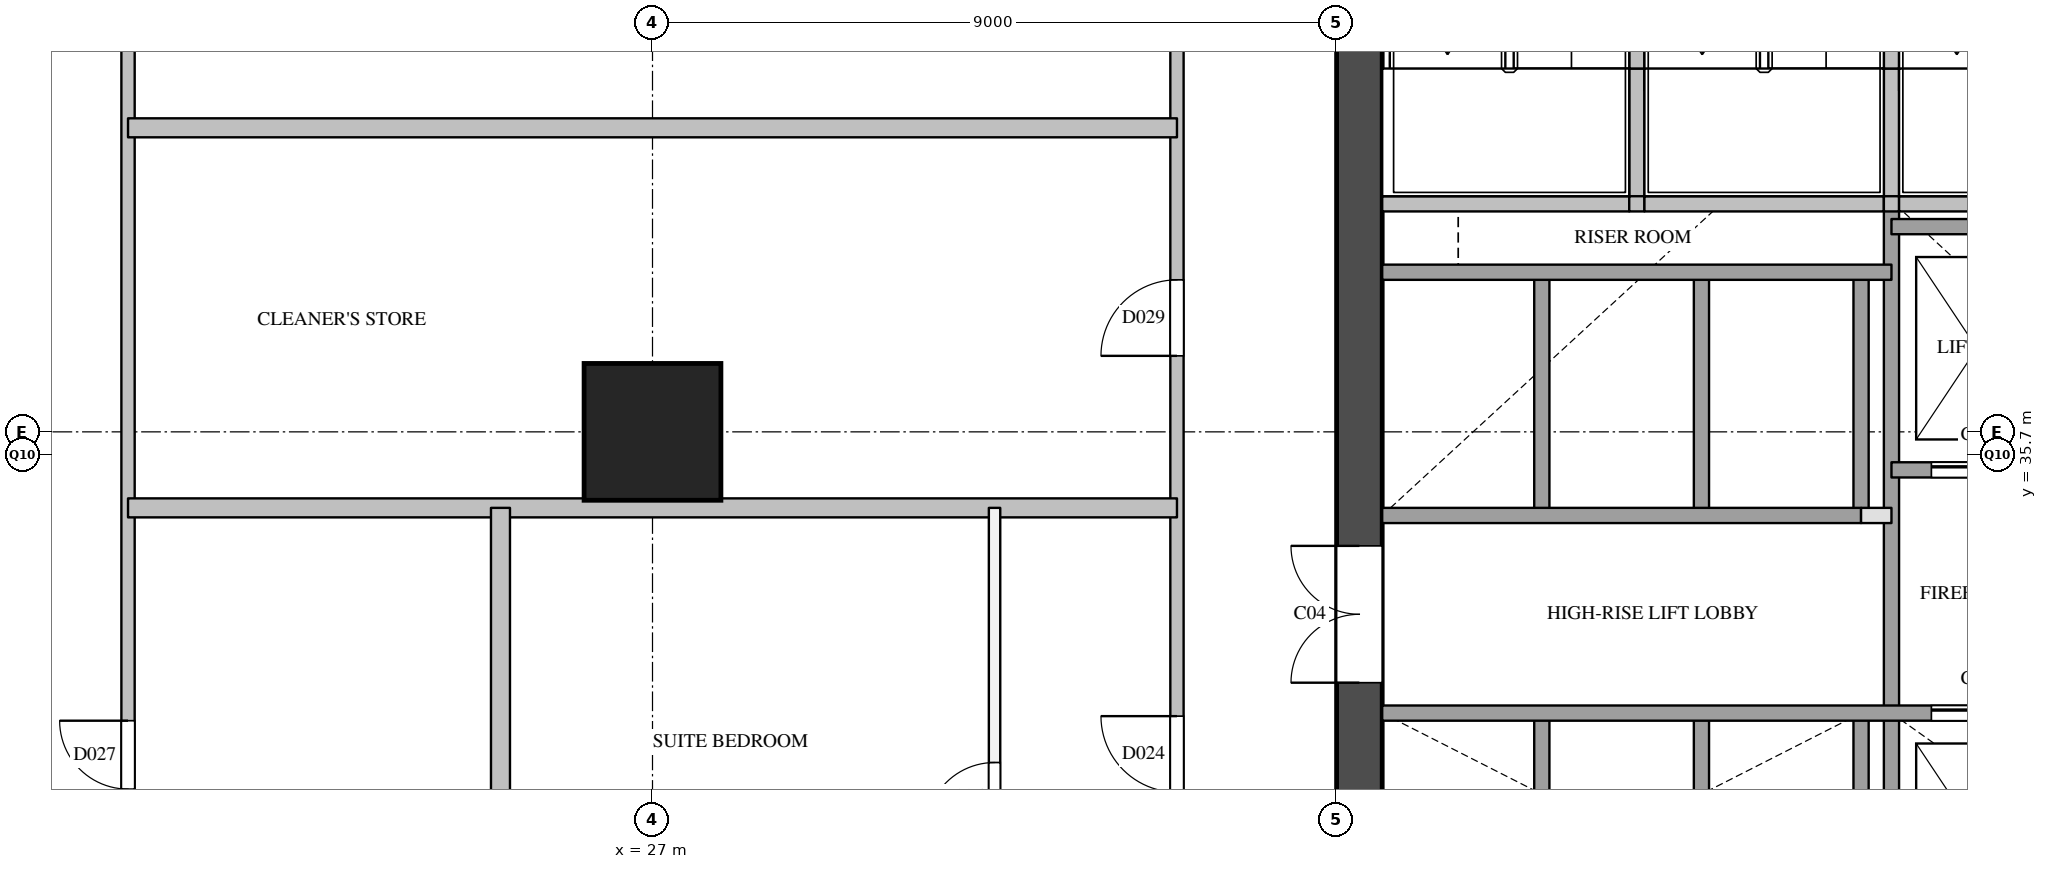
"""IFC4 building model, lengths in metres.
Left out: names, types, materials, properties, quantities, classifications, styles, units other than length and angle.
Written with IfcOpenShell. Run it as: python <this file> out.ifc"""

import sys

from ifc_helpers import new_model, si_unit, direction, frame, frame_2d, origin, origin_2d, place, context, subcontext, project, spatial, rectangle, extrude, element, fill, save


model = new_model("IFC4")
c1 = context("Model", 3, precision=1e-05, world=origin(), true_north=direction((0.0, 1.0)))
c2 = subcontext(c1, "Body", "Model", "MODEL_VIEW")
j1 = project(units=[si_unit("LENGTHUNIT", "METRE"), si_unit("PLANEANGLEUNIT", "RADIAN")], contexts=[c1])
p1 = place(None, origin())
s1 = spatial("IfcSite", under=j1, at=p1, CompositionType="ELEMENT")
p2 = place(p1, origin())
s2 = spatial("IfcBuilding", under=s1, at=p2, CompositionType="ELEMENT")
p3 = place(p2, frame((0.0, 0.0, 85.4)))
s3 = spatial("IfcBuildingStorey", under=s2, at=p3, CompositionType="ELEMENT", Elevation=85.4)
p4 = place(p3, frame((27.0, 36.0, 0.0), z_axis=(0.0, 0.0, 1.0), x_axis=(1.0, 0.0, 0.0)))
e1 = element("IfcColumn", 1, at=p4, inside=s3, PredefinedType="COLUMN", context=c2, shape_type="SweptSolid", body=[
    extrude(rectangle(XDim=1.8, YDim=1.8, at=origin_2d()), origin(), (0.0, 0.0, 1.0), 3.8),
])
p5 = place(p3, frame((36.3, 29.1, 0.0), z_axis=(0.0, 0.0, 1.0), x_axis=(0.0, 1.0, 0.0)))
e2 = element("IfcWall", 2, at=p5, inside=s3, PredefinedType="SHEAR", context=c2, shape_type="SweptSolid", body=[
    extrude(rectangle(XDim=20.3, YDim=0.6, at=frame_2d((10.15, 0.0))), origin(), (0.0, 0.0, 1.0), 3.5),
])
p6 = place(p5, frame((3.6, 0.0, 0.0)))
e3 = element("IfcOpeningElement", 3, at=p6, cuts=e2, PredefinedType="OPENING", context=c2, shape_type="SweptSolid", body=[
    extrude(rectangle(XDim=1.8, YDim=2.1, at=frame_2d((0.9, 1.05))), frame((0.0, 0.31, 0.0), z_axis=(0.0, -1.0, 0.0), x_axis=(1.0, 0.0, 0.0)), (0.0, 0.0, 1.0), 0.62),
])
p7 = place(p5, frame((16.4, 0.0, 0.0)))
e4 = element("IfcOpeningElement", 4, at=p7, cuts=e2, PredefinedType="OPENING", context=c2, shape_type="SweptSolid", body=[
    extrude(rectangle(XDim=1.0, YDim=2.1, at=frame_2d((0.5, 1.05))), frame((0.0, 0.31, 0.0), z_axis=(0.0, -1.0, 0.0), x_axis=(1.0, 0.0, 0.0)), (0.0, 0.0, 1.0), 0.62),
])
p8 = place(p3, frame((38.7, 29.1, 0.0), z_axis=(0.0, 0.0, 1.0), x_axis=(0.0, 1.0, 0.0)))
e5 = element("IfcWall", 5, at=p8, inside=s3, PredefinedType="SOLIDWALL", context=c2, shape_type="SweptSolid", body=[
    extrude(rectangle(XDim=3.2, YDim=0.2, at=frame_2d((1.6, 0.0))), origin(), (0.0, 0.0, 1.0), 3.5),
])
p9 = place(p3, frame((38.7, 34.9, 0.0), z_axis=(0.0, 0.0, 1.0), x_axis=(0.0, 1.0, 0.0)))
e6 = element("IfcWall", 6, at=p9, inside=s3, PredefinedType="SOLIDWALL", context=c2, shape_type="SweptSolid", body=[
    extrude(rectangle(XDim=3.2, YDim=0.2, at=frame_2d((1.6, 0.0))), origin(), (0.0, 0.0, 1.0), 3.5),
])
p10 = place(p3, frame((39.95, 39.0, 0.0), z_axis=(0.0, 0.0, 1.0), x_axis=(0.0, 1.0, 0.0)))
e7 = element("IfcWall", 7, at=p10, inside=s3, PredefinedType="SOLIDWALL", context=c2, shape_type="SweptSolid", body=[
    extrude(rectangle(XDim=1.78, YDim=0.2, at=frame_2d((0.89, 0.0))), origin(), (0.0, 0.0, 1.0), 3.5),
])
p11 = place(p3, frame((39.95, 40.78, 0.0), z_axis=(0.0, 0.0, 1.0), x_axis=(0.0, 1.0, 0.0)))
e8 = element("IfcWall", 8, at=p11, inside=s3, PredefinedType="SOLIDWALL", context=c2, shape_type="SweptSolid", body=[
    extrude(rectangle(XDim=4.42, YDim=0.2, at=frame_2d((2.21, 0.0))), origin(), (0.0, 0.0, 1.0), 3.5),
])
p12 = place(p3, frame((40.8, 29.1, 0.0), z_axis=(0.0, 0.0, 1.0), x_axis=(0.0, 1.0, 0.0)))
e9 = element("IfcWall", 9, at=p12, inside=s3, PredefinedType="SOLIDWALL", context=c2, shape_type="SweptSolid", body=[
    extrude(rectangle(XDim=3.2, YDim=0.2, at=frame_2d((1.6, 0.0))), origin(), (0.0, 0.0, 1.0), 3.5),
])
p13 = place(p3, frame((40.8, 34.9, 0.0), z_axis=(0.0, 0.0, 1.0), x_axis=(0.0, 1.0, 0.0)))
e10 = element("IfcWall", 10, at=p13, inside=s3, PredefinedType="SOLIDWALL", context=c2, shape_type="SweptSolid", body=[
    extrude(rectangle(XDim=3.2, YDim=0.2, at=frame_2d((1.6, 0.0))), origin(), (0.0, 0.0, 1.0), 3.5),
])
p14 = place(p3, frame((42.9, 29.1, 0.0), z_axis=(0.0, 0.0, 1.0), x_axis=(0.0, 1.0, 0.0)))
e11 = element("IfcWall", 11, at=p14, inside=s3, PredefinedType="SOLIDWALL", context=c2, shape_type="SweptSolid", body=[
    extrude(rectangle(XDim=3.2, YDim=0.2, at=frame_2d((1.6, 0.0))), origin(), (0.0, 0.0, 1.0), 3.5),
])
p15 = place(p3, frame((42.9, 34.9, 0.0), z_axis=(0.0, 0.0, 1.0), x_axis=(0.0, 1.0, 0.0)))
e12 = element("IfcWall", 12, at=p15, inside=s3, PredefinedType="SOLIDWALL", context=c2, shape_type="SweptSolid", body=[
    extrude(rectangle(XDim=3.2, YDim=0.2, at=frame_2d((1.6, 0.0))), origin(), (0.0, 0.0, 1.0), 3.5),
])
p16 = place(p3, frame((43.3, 29.1, 0.0), z_axis=(0.0, 0.0, 1.0), x_axis=(0.0, 1.0, 0.0)))
e13 = element("IfcWall", 13, at=p16, inside=s3, PredefinedType="SOLIDWALL", context=c2, shape_type="SweptSolid", body=[
    extrude(rectangle(XDim=9.9, YDim=0.2, at=frame_2d((4.95, 0.0))), origin(), (0.0, 0.0, 1.0), 3.5),
])
p17 = place(p3, frame((43.3, 39.0, 0.0), z_axis=(0.0, 0.0, 1.0), x_axis=(0.0, 1.0, 0.0)))
e14 = element("IfcWall", 14, at=p17, inside=s3, PredefinedType="SOLIDWALL", context=c2, shape_type="SweptSolid", body=[
    extrude(rectangle(XDim=1.78, YDim=0.2, at=frame_2d((0.89, 0.0))), origin(), (0.0, 0.0, 1.0), 3.5),
])
p18 = place(p3, frame((43.3, 40.78, 0.0), z_axis=(0.0, 0.0, 1.0), x_axis=(0.0, 1.0, 0.0)))
e15 = element("IfcWall", 15, at=p18, inside=s3, PredefinedType="SOLIDWALL", context=c2, shape_type="SweptSolid", body=[
    extrude(rectangle(XDim=4.42, YDim=0.2, at=frame_2d((2.21, 0.0))), origin(), (0.0, 0.0, 1.0), 3.5),
])
p19 = place(p3, frame((36.6, 32.3, 0.0), z_axis=(0.0, 0.0, 1.0), x_axis=(1.0, 0.0, 0.0)))
e16 = element("IfcWall", 16, at=p19, inside=s3, PredefinedType="SOLIDWALL", context=c2, shape_type="SweptSolid", body=[
    extrude(rectangle(XDim=11.2, YDim=0.2, at=frame_2d((5.6, 0.0))), origin(), (0.0, 0.0, 1.0), 3.5),
])
p20 = place(p19, frame((7.225, 0.0, 0.0)))
e17 = element("IfcOpeningElement", 17, at=p20, cuts=e16, PredefinedType="OPENING", context=c2, shape_type="SweptSolid", body=[
    extrude(rectangle(XDim=1.2, YDim=2.1, at=frame_2d((0.6, 1.05))), frame((0.0, 0.11, 0.0), z_axis=(0.0, -1.0, 0.0), x_axis=(1.0, 0.0, 0.0)), (0.0, 0.0, 1.0), 0.22),
])
p21 = place(p19, frame((9.475, 0.0, 0.0)))
e18 = element("IfcOpeningElement", 18, at=p21, cuts=e16, PredefinedType="OPENING", context=c2, shape_type="SweptSolid", body=[
    extrude(rectangle(XDim=1.2, YDim=2.1, at=frame_2d((0.6, 1.05))), frame((0.0, 0.11, 0.0), z_axis=(0.0, -1.0, 0.0), x_axis=(1.0, 0.0, 0.0)), (0.0, 0.0, 1.0), 0.22),
])
p22 = place(p3, frame((42.9, 34.9, 0.0), z_axis=(0.0, 0.0, 1.0), x_axis=(1.0, 0.0, 0.0)))
e19 = element("IfcWall", 19, at=p22, inside=s3, PredefinedType="PARTITIONING", context=c2, shape_type="SweptSolid", body=[
    extrude(rectangle(XDim=0.4, YDim=0.2, at=frame_2d((0.2, 0.0))), origin(), (0.0, 0.0, 1.0), 3.5),
])
p23 = place(p3, frame((36.6, 34.9, 0.0), z_axis=(0.0, 0.0, 1.0), x_axis=(1.0, 0.0, 0.0)))
e20 = element("IfcWall", 20, at=p23, inside=s3, PredefinedType="SOLIDWALL", context=c2, shape_type="SweptSolid", body=[
    extrude(rectangle(XDim=6.3, YDim=0.2, at=frame_2d((3.15, 0.0))), origin(), (0.0, 0.0, 1.0), 3.5),
])
p24 = place(p3, frame((43.3, 35.5, 0.0), z_axis=(0.0, 0.0, 1.0), x_axis=(1.0, 0.0, 0.0)))
e21 = element("IfcWall", 21, at=p24, inside=s3, PredefinedType="SOLIDWALL", context=c2, shape_type="SweptSolid", body=[
    extrude(rectangle(XDim=4.5, YDim=0.2, at=frame_2d((2.25, 0.0))), origin(), (0.0, 0.0, 1.0), 3.5),
])
p25 = place(p24, frame((0.525, 0.0, 0.0)))
e22 = element("IfcOpeningElement", 22, at=p25, cuts=e21, PredefinedType="OPENING", context=c2, shape_type="SweptSolid", body=[
    extrude(rectangle(XDim=1.2, YDim=2.1, at=frame_2d((0.6, 1.05))), frame((0.0, 0.11, 0.0), z_axis=(0.0, -1.0, 0.0), x_axis=(1.0, 0.0, 0.0)), (0.0, 0.0, 1.0), 0.22),
])
p26 = place(p24, frame((3.025, 0.0, 0.0)))
e23 = element("IfcOpeningElement", 23, at=p26, cuts=e21, PredefinedType="OPENING", context=c2, shape_type="SweptSolid", body=[
    extrude(rectangle(XDim=0.7, YDim=2.1, at=frame_2d((0.35, 1.05))), frame((0.0, 0.11, 0.0), z_axis=(0.0, -1.0, 0.0), x_axis=(1.0, 0.0, 0.0)), (0.0, 0.0, 1.0), 0.22),
])
p27 = place(p3, frame((36.6, 38.1, 0.0), z_axis=(0.0, 0.0, 1.0), x_axis=(1.0, 0.0, 0.0)))
e24 = element("IfcWall", 24, at=p27, inside=s3, PredefinedType="SOLIDWALL", context=c2, shape_type="SweptSolid", body=[
    extrude(rectangle(XDim=6.7, YDim=0.2, at=frame_2d((3.35, 0.0))), origin(), (0.0, 0.0, 1.0), 3.5),
])
p28 = place(p3, frame((43.3, 38.7, 0.0), z_axis=(0.0, 0.0, 1.0), x_axis=(1.0, 0.0, 0.0)))
e25 = element("IfcWall", 25, at=p28, inside=s3, PredefinedType="SOLIDWALL", context=c2, shape_type="SweptSolid", body=[
    extrude(rectangle(XDim=4.5, YDim=0.2, at=frame_2d((2.25, 0.0))), origin(), (0.0, 0.0, 1.0), 3.5),
])
p29 = place(p3, frame((36.6, 39.0, 0.0), z_axis=(0.0, 0.0, 1.0), x_axis=(1.0, 0.0, 0.0)))
e26 = element("IfcWall", 26, at=p29, inside=s3, PredefinedType="SOLIDWALL", context=c2, shape_type="SweptSolid", body=[
    extrude(rectangle(XDim=3.25, YDim=0.2, at=frame_2d((1.625, 0.0))), origin(), (0.0, 0.0, 1.0), 3.5),
])
p30 = place(p3, frame((39.85, 39.0, 0.0), z_axis=(0.0, 0.0, 1.0), x_axis=(1.0, 0.0, 0.0)))
e27 = element("IfcWall", 27, at=p30, inside=s3, PredefinedType="SOLIDWALL", context=c2, shape_type="SweptSolid", body=[
    extrude(rectangle(XDim=0.2, YDim=0.2, at=frame_2d((0.1, 0.0))), origin(), (0.0, 0.0, 1.0), 3.5),
])
p31 = place(p3, frame((40.05, 39.0, 0.0), z_axis=(0.0, 0.0, 1.0), x_axis=(1.0, 0.0, 0.0)))
e28 = element("IfcWall", 28, at=p31, inside=s3, PredefinedType="SOLIDWALL", context=c2, shape_type="SweptSolid", body=[
    extrude(rectangle(XDim=3.15, YDim=0.2, at=frame_2d((1.575, 0.0))), origin(), (0.0, 0.0, 1.0), 3.5),
])
p32 = place(p3, frame((43.2, 39.0, 0.0), z_axis=(0.0, 0.0, 1.0), x_axis=(1.0, 0.0, 0.0)))
e29 = element("IfcWall", 29, at=p32, inside=s3, PredefinedType="SOLIDWALL", context=c2, shape_type="SweptSolid", body=[
    extrude(rectangle(XDim=0.2, YDim=0.2, at=frame_2d((0.1, 0.0))), origin(), (0.0, 0.0, 1.0), 3.5),
])
p33 = place(p3, frame((43.4, 39.0, 0.0), z_axis=(0.0, 0.0, 1.0), x_axis=(1.0, 0.0, 0.0)))
e30 = element("IfcWall", 30, at=p33, inside=s3, PredefinedType="SOLIDWALL", context=c2, shape_type="SweptSolid", body=[
    extrude(rectangle(XDim=3.25, YDim=0.2, at=frame_2d((1.625, 0.0))), origin(), (0.0, 0.0, 1.0), 3.5),
])
p34 = place(p3, frame((20.1, 28.5, 0.0), z_axis=(0.0, 0.0, 1.0), x_axis=(0.0, 1.0, 0.0)))
e31 = element("IfcWall", 31, at=p34, inside=s3, PredefinedType="PARTITIONING", context=c2, shape_type="SweptSolid", body=[
    extrude(rectangle(XDim=23.6, YDim=0.175, at=frame_2d((11.8, 0.0))), origin(), (0.0, 0.0, 1.0), 3.5),
])
p35 = place(p34, frame((2.8, 0.0, 0.0)))
e32 = element("IfcOpeningElement", 32, at=p35, cuts=e31, PredefinedType="OPENING", context=c2, shape_type="SweptSolid", body=[
    extrude(rectangle(XDim=0.9, YDim=2.1, at=frame_2d((0.45, 1.05))), frame((0.0, 0.097, 0.0), z_axis=(0.0, -1.0, 0.0), x_axis=(1.0, 0.0, 0.0)), (0.0, 0.0, 1.0), 0.195),
])
p36 = place(p34, frame((19.6, 0.0, 0.0)))
e33 = element("IfcOpeningElement", 33, at=p36, cuts=e31, PredefinedType="OPENING", context=c2, shape_type="SweptSolid", body=[
    extrude(rectangle(XDim=0.9, YDim=2.1, at=frame_2d((0.45, 1.05))), frame((0.0, 0.097, 0.0), z_axis=(0.0, -1.0, 0.0), x_axis=(1.0, 0.0, 0.0)), (0.0, 0.0, 1.0), 0.195),
])
p37 = place(p3, frame((33.9, 28.52, 0.0), z_axis=(0.0, 0.0, 1.0), x_axis=(0.0, 1.0, 0.0)))
e34 = element("IfcWall", 34, at=p37, inside=s3, PredefinedType="PARTITIONING", context=c2, shape_type="SweptSolid", body=[
    extrude(rectangle(XDim=23.58, YDim=0.175, at=frame_2d((11.79, 0.0))), origin(), (0.0, 0.0, 1.0), 3.5),
])
p38 = place(p37, frame((2.74, 0.0, 0.0)))
e35 = element("IfcOpeningElement", 35, at=p38, cuts=e34, PredefinedType="OPENING", context=c2, shape_type="SweptSolid", body=[
    extrude(rectangle(XDim=1.0, YDim=2.1, at=frame_2d((0.5, 1.05))), frame((0.0, 0.097, 0.0), z_axis=(0.0, -1.0, 0.0), x_axis=(1.0, 0.0, 0.0)), (0.0, 0.0, 1.0), 0.195),
])
p39 = place(p37, frame((8.48, 0.0, 0.0)))
e36 = element("IfcOpeningElement", 36, at=p39, cuts=e34, PredefinedType="OPENING", context=c2, shape_type="SweptSolid", body=[
    extrude(rectangle(XDim=1.0, YDim=2.1, at=frame_2d((0.5, 1.05))), frame((0.0, 0.097, 0.0), z_axis=(0.0, -1.0, 0.0), x_axis=(1.0, 0.0, 0.0)), (0.0, 0.0, 1.0), 0.195),
])
p40 = place(p37, frame((13.48, 0.0, 0.0)))
e37 = element("IfcOpeningElement", 37, at=p40, cuts=e34, PredefinedType="OPENING", context=c2, shape_type="SweptSolid", body=[
    extrude(rectangle(XDim=1.0, YDim=2.1, at=frame_2d((0.5, 1.05))), frame((0.0, 0.097, 0.0), z_axis=(0.0, -1.0, 0.0), x_axis=(1.0, 0.0, 0.0)), (0.0, 0.0, 1.0), 0.195),
])
p41 = place(p3, frame((31.5, 27.4, 0.0), z_axis=(0.0, 0.0, 1.0), x_axis=(0.0, 1.0, 0.0)))
e38 = element("IfcWall", 38, at=p41, inside=s3, PredefinedType="PARTITIONING", context=c2, shape_type="SweptSolid", body=[
    extrude(rectangle(XDim=7.6, YDim=0.15, at=frame_2d((3.8, 0.0))), origin(), (0.0, 0.0, 1.0), 2.5),
])
p42 = place(p41, frame((3.35, 0.0, 0.0)))
e39 = element("IfcOpeningElement", 39, at=p42, cuts=e38, PredefinedType="OPENING", context=c2, shape_type="SweptSolid", body=[
    extrude(rectangle(XDim=0.9, YDim=2.1, at=frame_2d((0.45, 1.05))), frame((0.0, 0.085, 0.0), z_axis=(0.0, -1.0, 0.0), x_axis=(1.0, 0.0, 0.0)), (0.0, 0.0, 1.0), 0.17),
])
for number, where, z_axis, x_axis in (
    (40, (20.1, 35.0, 0.0), (0.0, 0.0, 1.0), (1.0, 0.0, 0.0)),
    (41, (20.1, 40.0, 0.0), (0.0, 0.0, 1.0), (1.0, 0.0, 0.0)),
):
    element("IfcWall", number, at=place(p3, frame(where, z_axis=z_axis, x_axis=x_axis)), inside=s3, PredefinedType="PARTITIONING", context=c2, shape_type="SweptSolid", body=[
        extrude(rectangle(XDim=13.8, YDim=0.25, at=frame_2d((6.9, 0.0))), origin(), (0.0, 0.0, 1.0), 2.5),
    ])
p43 = place(p3, frame((25.0, 27.0, 0.0), z_axis=(0.0, 0.0, 1.0), x_axis=(0.0, 1.0, 0.0)))
e42 = element("IfcWall", 42, at=p43, inside=s3, PredefinedType="PARTITIONING", context=c2, shape_type="SweptSolid", body=[
    extrude(rectangle(XDim=8.0, YDim=0.25, at=frame_2d((4.0, 0.0))), origin(), (0.0, 0.0, 1.0), 2.5),
])
p44 = place(p20, origin())
e43 = element("IfcDoor", 43, at=p44, inside=s3, OperationType="SLIDING_TO_LEFT", PredefinedType="DOOR", context=c2, shape_type="SweptSolid", body=[
    extrude(rectangle(XDim=1.2, YDim=2.1, at=frame_2d((0.6, 1.05))), frame((0.0, 0.025, 0.0), z_axis=(0.0, -1.0, 0.0), x_axis=(1.0, 0.0, 0.0)), (0.0, 0.0, 1.0), 0.05),
])
fill(e17, e43)
p45 = place(p25, origin())
e44 = element("IfcDoor", 44, at=p45, inside=s3, OperationType="SLIDING_TO_LEFT", PredefinedType="DOOR", context=c2, shape_type="SweptSolid", body=[
    extrude(rectangle(XDim=1.2, YDim=2.1, at=frame_2d((0.6, 1.05))), frame((0.0, 0.025, 0.0), z_axis=(0.0, -1.0, 0.0), x_axis=(1.0, 0.0, 0.0)), (0.0, 0.0, 1.0), 0.05),
])
fill(e22, e44)
p46 = place(p6, origin())
e45 = element("IfcDoor", 45, at=p46, inside=s3, OperationType="DOUBLE_DOOR_SINGLE_SWING", PredefinedType="DOOR", context=c2, shape_type="SweptSolid", body=[
    extrude(rectangle(XDim=1.8, YDim=2.1, at=frame_2d((0.9, 1.05))), frame((0.0, 0.025, 0.0), z_axis=(0.0, -1.0, 0.0), x_axis=(1.0, 0.0, 0.0)), (0.0, 0.0, 1.0), 0.05),
])
fill(e3, e45)
p47 = place(p38, origin())
e46 = element("IfcDoor", 46, at=p47, inside=s3, OperationType="SINGLE_SWING_RIGHT", PredefinedType="DOOR", context=c2, shape_type="SweptSolid", body=[
    extrude(rectangle(XDim=1.0, YDim=2.1, at=frame_2d((0.5, 1.05))), frame((0.0, 0.025, 0.0), z_axis=(0.0, -1.0, 0.0), x_axis=(1.0, 0.0, 0.0)), (0.0, 0.0, 1.0), 0.05),
])
fill(e35, e46)
p48 = place(p42, origin())
e47 = element("IfcDoor", 47, at=p48, inside=s3, OperationType="SINGLE_SWING_LEFT", PredefinedType="DOOR", context=c2, shape_type="SweptSolid", body=[
    extrude(rectangle(XDim=0.9, YDim=2.1, at=frame_2d((0.45, 1.05))), frame((0.0, 0.025, 0.0), z_axis=(0.0, -1.0, 0.0), x_axis=(1.0, 0.0, 0.0)), (0.0, 0.0, 1.0), 0.05),
])
fill(e39, e47)
p49 = place(p35, origin())
e48 = element("IfcDoor", 48, at=p49, inside=s3, OperationType="SINGLE_SWING_RIGHT", PredefinedType="DOOR", context=c2, shape_type="SweptSolid", body=[
    extrude(rectangle(XDim=0.9, YDim=2.1, at=frame_2d((0.45, 1.05))), frame((0.0, 0.025, 0.0), z_axis=(0.0, -1.0, 0.0), x_axis=(1.0, 0.0, 0.0)), (0.0, 0.0, 1.0), 0.05),
])
fill(e32, e48)
p50 = place(p39, origin())
e49 = element("IfcDoor", 49, at=p50, inside=s3, OperationType="SINGLE_SWING_LEFT", PredefinedType="DOOR", context=c2, shape_type="SweptSolid", body=[
    extrude(rectangle(XDim=1.0, YDim=2.1, at=frame_2d((0.5, 1.05))), frame((0.0, 0.025, 0.0), z_axis=(0.0, -1.0, 0.0), x_axis=(1.0, 0.0, 0.0)), (0.0, 0.0, 1.0), 0.05),
])
fill(e36, e49)
save(model, sys.argv[1])
